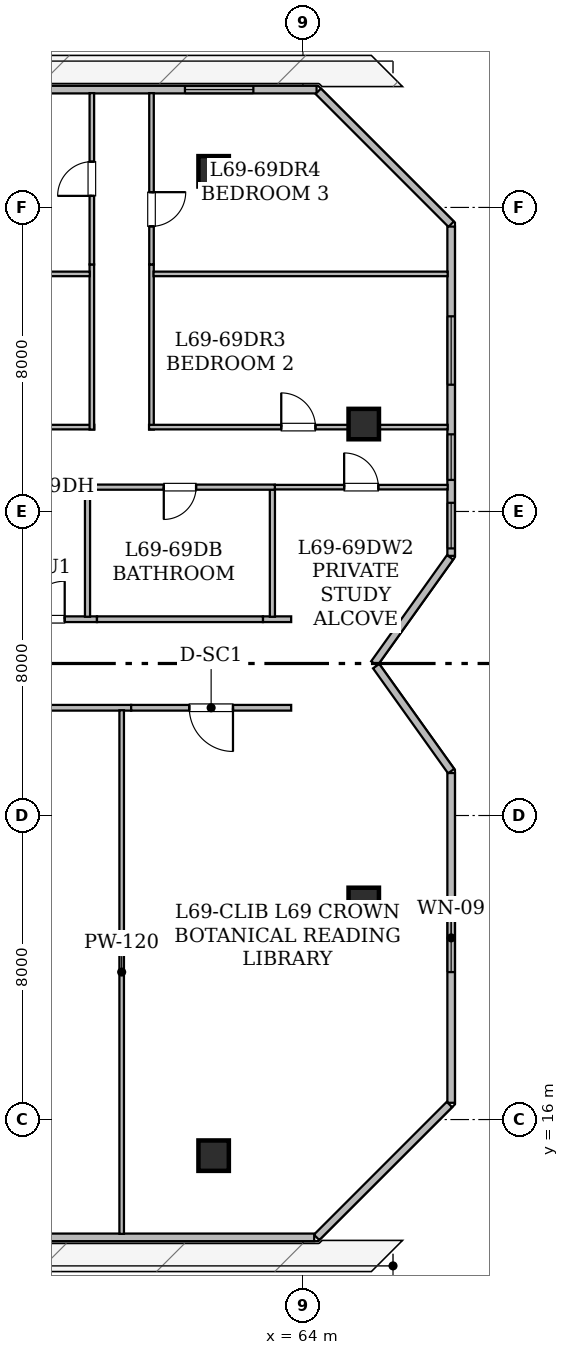
"""IFC4 building model, lengths in metres.
Left out: names, types, materials, properties, quantities, classifications, styles, units other than length and angle.
Written with IfcOpenShell. Run it as: python <this file> out.ifc"""

import sys

from ifc_helpers import new_model, si_unit, direction, frame, frame_2d, origin, origin_2d, place, context, subcontext, project, spatial, rectangle, hollow_rectangle, extrude, element, fill, save


model = new_model("IFC4")
c1 = context("Model", 3, precision=1e-05, world=origin(), true_north=direction((0.0, 1.0)))
c2 = subcontext(c1, "Body", "Model", "MODEL_VIEW")
j1 = project(units=[si_unit("LENGTHUNIT", "METRE"), si_unit("PLANEANGLEUNIT", "RADIAN")], contexts=[c1])
p1 = place(None, origin())
s1 = spatial("IfcSite", under=j1, at=p1, CompositionType="ELEMENT")
p2 = place(p1, origin())
s2 = spatial("IfcBuilding", under=s1, at=p2, CompositionType="ELEMENT")
p3 = place(p2, frame((0.0, 0.0, 269.45)))
s3 = spatial("IfcBuildingStorey", under=s2, at=p3, CompositionType="ELEMENT", Elevation=269.45)
for number, where, z_axis, x_axis in (
    (1, (61.65, 15.05, 0.025), (0.0, 0.0, 1.0), (1.0, 0.0, 0.0)),
    (2, (61.65, 40.95, 0.025), (0.0, 0.0, 1.0), (1.0, 0.0, 0.0)),
    (3, (65.6, 21.7, 0.025), (0.0, 0.0, 1.0), (1.0, 0.0, 0.0)),
    (4, (65.6, 34.3, 0.025), (0.0, 0.0, 1.0), (1.0, 0.0, 0.0)),
):
    element("IfcColumn", number, at=place(p3, frame(where, z_axis=z_axis, x_axis=x_axis)), inside=s3, PredefinedType="COLUMN", context=c2, shape_type="SweptSolid", body=[
        extrude(hollow_rectangle(XDim=0.8, YDim=0.8, WallThickness=0.04, at=origin_2d()), origin(), (0.0, 0.0, 1.0), 4.175),
    ])
p4 = place(p3, frame((25.702, 43.1, 0.0), z_axis=(0.0, 0.0, 1.0), x_axis=(1.0, 0.0, 0.0)))
e5 = element("IfcWall", 5, at=p4, inside=s3, PredefinedType="STANDARD", context=c2, shape_type="SweptSolid", body=[
    extrude(rectangle(XDim=38.657, YDim=0.2, at=frame_2d((19.329, 0.0))), origin(), (0.0, 0.0, 1.0), 3.95),
])
p5 = place(p4, frame((22.05, 0.0, 0.0)))
e6 = element("IfcOpeningElement", 6, at=p5, cuts=e5, PredefinedType="OPENING", context=c2, shape_type="SweptSolid", body=[
    extrude(rectangle(XDim=1.0, YDim=2.15, at=frame_2d((0.5, 1.075))), frame((0.0, 0.11, 0.0), z_axis=(0.0, -1.0, 0.0), x_axis=(1.0, 0.0, 0.0)), (0.0, 0.0, 1.0), 0.22),
])
p6 = place(p4, frame((18.633, 0.0, 0.78)))
e7 = element("IfcOpeningElement", 7, at=p6, cuts=e5, PredefinedType="OPENING", context=c2, shape_type="SweptSolid", body=[
    extrude(rectangle(XDim=1.2, YDim=1.5, at=frame_2d((0.6, 0.75))), frame((0.0, 0.11, 0.0), z_axis=(0.0, -1.0, 0.0), x_axis=(1.0, 0.0, 0.0)), (0.0, 0.0, 1.0), 0.22),
])
p7 = place(p4, frame((27.873, 0.0, 0.85)))
e8 = element("IfcOpeningElement", 8, at=p7, cuts=e5, PredefinedType="OPENING", context=c2, shape_type="SweptSolid", body=[
    extrude(rectangle(XDim=1.8, YDim=0.92, at=frame_2d((0.9, 0.46))), frame((0.0, 0.11, 0.0), z_axis=(0.0, -1.0, 0.0), x_axis=(1.0, 0.0, 0.0)), (0.0, 0.0, 1.0), 0.22),
])
p8 = place(p4, frame((35.193, 0.0, 0.85)))
e9 = element("IfcOpeningElement", 9, at=p8, cuts=e5, PredefinedType="OPENING", context=c2, shape_type="SweptSolid", body=[
    extrude(rectangle(XDim=1.8, YDim=0.92, at=frame_2d((0.9, 0.46))), frame((0.0, 0.11, 0.0), z_axis=(0.0, -1.0, 0.0), x_axis=(1.0, 0.0, 0.0)), (0.0, 0.0, 1.0), 0.22),
])
p9 = place(p3, frame((64.402, 43.057, 0.0), z_axis=(0.0, 0.0, 1.0), x_axis=(0.707106781187, -0.707106781187, 0.0)))
e10 = element("IfcWall", 10, at=p9, inside=s3, PredefinedType="STANDARD", context=c2, shape_type="SweptSolid", body=[
    extrude(rectangle(XDim=4.947, YDim=0.2, at=frame_2d((2.473, 0.0))), origin(), (0.0, 0.0, 1.0), 3.95),
])
p10 = place(p3, frame((67.9, 39.497, 0.0), z_axis=(0.0, 0.0, 1.0), x_axis=(0.0, -1.0, 0.0)))
e11 = element("IfcWall", 11, at=p10, inside=s3, PredefinedType="STANDARD", context=c2, shape_type="SweptSolid", body=[
    extrude(rectangle(XDim=8.665, YDim=0.2, at=frame_2d((4.333, 0.0))), origin(), (0.0, 0.0, 1.0), 3.95),
])
p11 = place(p10, frame((7.269, 0.0, 0.78)))
e12 = element("IfcOpeningElement", 12, at=p11, cuts=e11, PredefinedType="OPENING", context=c2, shape_type="SweptSolid", body=[
    extrude(rectangle(XDim=1.2, YDim=1.5, at=frame_2d((0.6, 0.75))), frame((0.0, 0.11, 0.0), z_axis=(0.0, -1.0, 0.0), x_axis=(1.0, 0.0, 0.0)), (0.0, 0.0, 1.0), 0.22),
])
p12 = place(p10, frame((5.467, 0.0, 0.78)))
e13 = element("IfcOpeningElement", 13, at=p12, cuts=e11, PredefinedType="OPENING", context=c2, shape_type="SweptSolid", body=[
    extrude(rectangle(XDim=1.2, YDim=1.5, at=frame_2d((0.6, 0.75))), frame((0.0, 0.11, 0.0), z_axis=(0.0, -1.0, 0.0), x_axis=(1.0, 0.0, 0.0)), (0.0, 0.0, 1.0), 0.22),
])
p13 = place(p10, frame((2.362, 0.0, 0.85)))
e14 = element("IfcOpeningElement", 14, at=p13, cuts=e11, PredefinedType="OPENING", context=c2, shape_type="SweptSolid", body=[
    extrude(rectangle(XDim=1.8, YDim=0.92, at=frame_2d((0.9, 0.46))), frame((0.0, 0.11, 0.0), z_axis=(0.0, -1.0, 0.0), x_axis=(1.0, 0.0, 0.0)), (0.0, 0.0, 1.0), 0.22),
])
p14 = place(p3, frame((67.872, 30.793, 0.0), z_axis=(0.0, 0.0, 1.0), x_axis=(-0.581265107027, -0.813714246743, 0.0)))
e15 = element("IfcWall", 15, at=p14, inside=s3, PredefinedType="STANDARD", context=c2, shape_type="SweptSolid", body=[
    extrude(rectangle(XDim=3.432, YDim=0.2, at=frame_2d((1.716, 0.0))), origin(), (0.0, 0.0, 1.0), 3.95),
])
p15 = place(p3, frame((65.926, 27.931, 0.0), z_axis=(0.0, 0.0, 1.0), x_axis=(0.581306204583, -0.813684887726, 0.0)))
e16 = element("IfcWall", 16, at=p15, inside=s3, PredefinedType="STANDARD", context=c2, shape_type="SweptSolid", body=[
    extrude(rectangle(XDim=3.396, YDim=0.2, at=frame_2d((1.698, 0.0))), origin(), (0.0, 0.0, 1.0), 3.95),
])
p16 = place(p3, frame((67.9, 25.118, 0.0), z_axis=(0.0, 0.0, 1.0), x_axis=(0.0, -1.0, 0.0)))
e17 = element("IfcWall", 17, at=p16, inside=s3, PredefinedType="STANDARD", context=c2, shape_type="SweptSolid", body=[
    extrude(rectangle(XDim=8.677, YDim=0.2, at=frame_2d((4.338, 0.0))), origin(), (0.0, 0.0, 1.0), 3.95),
])
p17 = place(p16, frame((3.438, 0.0, 0.85)))
e18 = element("IfcOpeningElement", 18, at=p17, cuts=e17, PredefinedType="OPENING", context=c2, shape_type="SweptSolid", body=[
    extrude(rectangle(XDim=1.8, YDim=0.92, at=frame_2d((0.9, 0.46))), frame((0.0, 0.11, 0.0), z_axis=(0.0, -1.0, 0.0), x_axis=(1.0, 0.0, 0.0)), (0.0, 0.0, 1.0), 0.22),
])
p18 = place(p3, frame((67.855, 16.396, 0.0), z_axis=(0.0, 0.0, 1.0), x_axis=(-0.707106781187, -0.707106781187, 0.0)))
e19 = element("IfcWall", 19, at=p18, inside=s3, PredefinedType="STANDARD", context=c2, shape_type="SweptSolid", body=[
    extrude(rectangle(XDim=4.944, YDim=0.2, at=frame_2d((2.472, 0.0))), origin(), (0.0, 0.0, 1.0), 3.95),
])
p19 = place(p3, frame((64.296, 12.9, 0.0), z_axis=(0.0, 0.0, 1.0), x_axis=(-1.0, 0.0, 0.0)))
e20 = element("IfcWall", 20, at=p19, inside=s3, PredefinedType="STANDARD", context=c2, shape_type="SweptSolid", body=[
    extrude(rectangle(XDim=38.593, YDim=0.2, at=frame_2d((19.296, 0.0))), origin(), (0.0, 0.0, 1.0), 3.95),
])
p20 = place(p19, frame((7.54, 0.0, 0.0)))
e21 = element("IfcOpeningElement", 21, at=p20, cuts=e20, PredefinedType="OPENING", context=c2, shape_type="SweptSolid", body=[
    extrude(rectangle(XDim=1.0, YDim=2.15, at=frame_2d((0.5, 1.075))), frame((0.0, 0.11, 0.0), z_axis=(0.0, -1.0, 0.0), x_axis=(1.0, 0.0, 0.0)), (0.0, 0.0, 1.0), 0.22),
])
p21 = place(p19, frame((18.396, 0.0, 0.78)))
e22 = element("IfcOpeningElement", 22, at=p21, cuts=e20, PredefinedType="OPENING", context=c2, shape_type="SweptSolid", body=[
    extrude(rectangle(XDim=1.2, YDim=1.5, at=frame_2d((0.6, 0.75))), frame((0.0, 0.11, 0.0), z_axis=(0.0, -1.0, 0.0), x_axis=(1.0, 0.0, 0.0)), (0.0, 0.0, 1.0), 0.22),
])
p22 = place(p19, frame((15.104, 0.0, 0.85)))
e23 = element("IfcOpeningElement", 23, at=p22, cuts=e20, PredefinedType="OPENING", context=c2, shape_type="SweptSolid", body=[
    extrude(rectangle(XDim=1.8, YDim=0.92, at=frame_2d((0.9, 0.46))), frame((0.0, 0.11, 0.0), z_axis=(0.0, -1.0, 0.0), x_axis=(1.0, 0.0, 0.0)), (0.0, 0.0, 1.0), 0.22),
])
p23 = place(p3, frame((59.479, 26.835, 0.0), z_axis=(0.0, 0.0, 1.0), x_axis=(-1.0, 0.0, 0.0)))
e24 = element("IfcWall", 24, at=p23, inside=s3, PredefinedType="STANDARD", context=c2, shape_type="SweptSolid", body=[
    extrude(rectangle(XDim=9.223, YDim=0.15, at=frame_2d((4.611, 0.0))), origin(), (0.0, 0.0, 1.0), 3.245),
])
p24 = place(p23, frame((4.161, 0.0, 0.0)))
e25 = element("IfcOpeningElement", 25, at=p24, cuts=e24, PredefinedType="OPENING", context=c2, shape_type="SweptSolid", body=[
    extrude(rectangle(XDim=0.9, YDim=2.1, at=frame_2d((0.45, 1.05))), frame((0.0, 0.085, 0.0), z_axis=(0.0, -1.0, 0.0), x_axis=(1.0, 0.0, 0.0)), (0.0, 0.0, 1.0), 0.17),
])
p25 = place(p3, frame((63.69, 26.835, 0.0), z_axis=(0.0, 0.0, 1.0), x_axis=(-1.0, 0.0, 0.0)))
e26 = element("IfcWall", 26, at=p25, inside=s3, PredefinedType="STANDARD", context=c2, shape_type="SweptSolid", body=[
    extrude(rectangle(XDim=4.211, YDim=0.15, at=frame_2d((2.105, 0.0))), origin(), (0.0, 0.0, 1.0), 3.95),
])
p26 = place(p25, frame((1.531, 0.0, 0.0)))
e27 = element("IfcOpeningElement", 27, at=p26, cuts=e26, PredefinedType="OPENING", context=c2, shape_type="SweptSolid", body=[
    extrude(rectangle(XDim=1.15, YDim=2.2, at=frame_2d((0.575, 1.1))), frame((0.0, 0.085, 0.0), z_axis=(0.0, -1.0, 0.0), x_axis=(1.0, 0.0, 0.0)), (0.0, 0.0, 1.0), 0.17),
])
p27 = place(p3, frame((62.947, 29.165, 0.0), z_axis=(0.0, 0.0, 1.0), x_axis=(1.0, 0.0, 0.0)))
e28 = element("IfcWall", 28, at=p27, inside=s3, PredefinedType="STANDARD", context=c2, shape_type="SweptSolid", body=[
    extrude(rectangle(XDim=0.743, YDim=0.15, at=frame_2d((0.372, 0.0))), origin(), (0.0, 0.0, 1.0), 3.95),
])
p28 = place(p3, frame((55.882, 29.165, 0.0), z_axis=(0.0, 0.0, 1.0), x_axis=(1.0, 0.0, 0.0)))
e29 = element("IfcWall", 29, at=p28, inside=s3, PredefinedType="STANDARD", context=c2, shape_type="SweptSolid", body=[
    extrude(rectangle(XDim=2.698, YDim=0.15, at=frame_2d((1.349, 0.0))), origin(), (0.0, 0.0, 1.0), 3.95),
])
p29 = place(p28, frame((0.849, 0.0, 0.0)))
e30 = element("IfcOpeningElement", 30, at=p29, cuts=e29, PredefinedType="OPENING", context=c2, shape_type="SweptSolid", body=[
    extrude(rectangle(XDim=1.0, YDim=2.15, at=frame_2d((0.5, 1.075))), frame((0.0, 0.085, 0.0), z_axis=(0.0, -1.0, 0.0), x_axis=(1.0, 0.0, 0.0)), (0.0, 0.0, 1.0), 0.17),
])
p30 = place(p3, frame((58.58, 29.165, 0.0), z_axis=(0.0, 0.0, 1.0), x_axis=(1.0, 0.0, 0.0)))
e31 = element("IfcWall", 31, at=p30, inside=s3, PredefinedType="STANDARD", context=c2, shape_type="SweptSolid", body=[
    extrude(rectangle(XDim=4.367, YDim=0.15, at=frame_2d((2.184, 0.0))), origin(), (0.0, 0.0, 1.0), 3.95),
])
p31 = place(p3, frame((59.23, 26.77, 0.0), z_axis=(0.0, 0.0, 1.0), x_axis=(0.0, -1.0, 0.0)))
e32 = element("IfcWall", 32, at=p31, inside=s3, PredefinedType="PARTITIONING", context=c2, shape_type="SweptSolid", body=[
    extrude(rectangle(XDim=13.778, YDim=0.12, at=frame_2d((6.889, 0.0))), origin(), (0.0, 0.0, 1.0), 3.245),
])
p32 = place(p3, frame((63.261, 32.64, 0.0), z_axis=(0.0, 0.0, 1.0), x_axis=(1.0, 0.0, 0.0)))
e33 = element("IfcWall", 33, at=p32, inside=s3, PredefinedType="PARTITIONING", context=c2, shape_type="SweptSolid", body=[
    extrude(rectangle(XDim=4.547, YDim=0.12, at=frame_2d((2.273, 0.0))), origin(), (0.0, 0.0, 1.0), 3.407),
])
p33 = place(p32, frame((1.823, 0.0, 0.0)))
e34 = element("IfcOpeningElement", 34, at=p33, cuts=e33, PredefinedType="OPENING", context=c2, shape_type="SweptSolid", body=[
    extrude(rectangle(XDim=0.9, YDim=2.1, at=frame_2d((0.45, 1.05))), frame((0.0, 0.07, 0.0), z_axis=(0.0, -1.0, 0.0), x_axis=(1.0, 0.0, 0.0)), (0.0, 0.0, 1.0), 0.14),
])
p34 = place(p3, frame((63.196, 29.23, 0.0), z_axis=(0.0, 0.0, 1.0), x_axis=(0.0, 1.0, 0.0)))
e35 = element("IfcWall", 35, at=p34, inside=s3, PredefinedType="PARTITIONING", context=c2, shape_type="SweptSolid", body=[
    extrude(rectangle(XDim=3.345, YDim=0.135, at=frame_2d((1.672, 0.0))), origin(), (0.0, 0.0, 1.0), 3.237),
])
p35 = place(p3, frame((63.261, 32.64, 0.0), z_axis=(0.0, 0.0, 1.0), x_axis=(-1.0, 0.0, 0.0)))
e36 = element("IfcWall", 36, at=p35, inside=s3, PredefinedType="PARTITIONING", context=c2, shape_type="SweptSolid", body=[
    extrude(rectangle(XDim=4.995, YDim=0.135, at=frame_2d((2.498, 0.0))), origin(), (0.0, 0.0, 1.0), 3.95),
])
p36 = place(p35, frame((2.073, 0.0, 0.0)))
e37 = element("IfcOpeningElement", 37, at=p36, cuts=e36, PredefinedType="OPENING", context=c2, shape_type="SweptSolid", body=[
    extrude(rectangle(XDim=0.85, YDim=2.1, at=frame_2d((0.425, 1.05))), frame((0.0, 0.077, 0.0), z_axis=(0.0, -1.0, 0.0), x_axis=(1.0, 0.0, 0.0)), (0.0, 0.0, 1.0), 0.155),
])
p37 = place(p3, frame((58.331, 32.705, 0.0), z_axis=(0.0, 0.0, 1.0), x_axis=(0.0, -1.0, 0.0)))
e38 = element("IfcWall", 38, at=p37, inside=s3, PredefinedType="PARTITIONING", context=c2, shape_type="SweptSolid", body=[
    extrude(rectangle(XDim=3.475, YDim=0.135, at=frame_2d((1.738, 0.0))), origin(), (0.0, 0.0, 1.0), 3.237),
])
p38 = place(p3, frame((50.577, 34.22, 0.0), z_axis=(0.0, 0.0, 1.0), x_axis=(1.0, 0.0, 0.0)))
e39 = element("IfcWall", 39, at=p38, inside=s3, PredefinedType="PARTITIONING", context=c2, shape_type="SweptSolid", body=[
    extrude(rectangle(XDim=7.933, YDim=0.12, at=frame_2d((3.967, 0.0))), origin(), (0.0, 0.0, 1.0), 3.237),
])
p39 = place(p38, frame((3.516, 0.0, 0.0)))
e40 = element("IfcOpeningElement", 40, at=p39, cuts=e39, PredefinedType="OPENING", context=c2, shape_type="SweptSolid", body=[
    extrude(rectangle(XDim=0.9, YDim=2.1, at=frame_2d((0.45, 1.05))), frame((0.0, 0.07, 0.0), z_axis=(0.0, -1.0, 0.0), x_axis=(1.0, 0.0, 0.0)), (0.0, 0.0, 1.0), 0.14),
])
p40 = place(p3, frame((58.445, 34.155, 0.0), z_axis=(0.0, 0.0, 1.0), x_axis=(0.0, 1.0, 0.0)))
e41 = element("IfcWall", 41, at=p40, inside=s3, PredefinedType="PARTITIONING", context=c2, shape_type="SweptSolid", body=[
    extrude(rectangle(XDim=4.345, YDim=0.12, at=frame_2d((2.172, 0.0))), origin(), (0.0, 0.0, 1.0), 3.237),
])
p41 = place(p3, frame((58.445, 38.5, 0.0), z_axis=(0.0, 0.0, 1.0), x_axis=(0.0, 1.0, 0.0)))
e42 = element("IfcWall", 42, at=p41, inside=s3, PredefinedType="PARTITIONING", context=c2, shape_type="SweptSolid", body=[
    extrude(rectangle(XDim=4.508, YDim=0.12, at=frame_2d((2.254, 0.0))), origin(), (0.0, 0.0, 1.0), 3.245),
])
p42 = place(p41, frame((1.804, 0.0, 0.0)))
e43 = element("IfcOpeningElement", 43, at=p42, cuts=e42, PredefinedType="OPENING", context=c2, shape_type="SweptSolid", body=[
    extrude(rectangle(XDim=0.9, YDim=2.1, at=frame_2d((0.45, 1.05))), frame((0.0, 0.07, 0.0), z_axis=(0.0, -1.0, 0.0), x_axis=(1.0, 0.0, 0.0)), (0.0, 0.0, 1.0), 0.14),
])
p43 = place(p3, frame((60.015, 38.5, 0.0), z_axis=(0.0, 0.0, 1.0), x_axis=(0.0, -1.0, 0.0)))
e44 = element("IfcWall", 44, at=p43, inside=s3, PredefinedType="PARTITIONING", context=c2, shape_type="SweptSolid", body=[
    extrude(rectangle(XDim=4.345, YDim=0.12, at=frame_2d((2.172, 0.0))), origin(), (0.0, 0.0, 1.0), 3.237),
])
p44 = place(p3, frame((59.95, 34.22, 0.0), z_axis=(0.0, 0.0, 1.0), x_axis=(1.0, 0.0, 0.0)))
e45 = element("IfcWall", 45, at=p44, inside=s3, PredefinedType="PARTITIONING", context=c2, shape_type="SweptSolid", body=[
    extrude(rectangle(XDim=7.858, YDim=0.12, at=frame_2d((3.929, 0.0))), origin(), (0.0, 0.0, 1.0), 3.237),
])
p45 = place(p44, frame((3.479, 0.0, 0.0)))
e46 = element("IfcOpeningElement", 46, at=p45, cuts=e45, PredefinedType="OPENING", context=c2, shape_type="SweptSolid", body=[
    extrude(rectangle(XDim=0.9, YDim=2.1, at=frame_2d((0.45, 1.05))), frame((0.0, 0.07, 0.0), z_axis=(0.0, -1.0, 0.0), x_axis=(1.0, 0.0, 0.0)), (0.0, 0.0, 1.0), 0.14),
])
p46 = place(p3, frame((60.015, 43.008, 0.0), z_axis=(0.0, 0.0, 1.0), x_axis=(0.0, -1.0, 0.0)))
e47 = element("IfcWall", 47, at=p46, inside=s3, PredefinedType="PARTITIONING", context=c2, shape_type="SweptSolid", body=[
    extrude(rectangle(XDim=4.508, YDim=0.12, at=frame_2d((2.254, 0.0))), origin(), (0.0, 0.0, 1.0), 3.245),
])
p47 = place(p46, frame((2.606, 0.0, 0.0)))
e48 = element("IfcOpeningElement", 48, at=p47, cuts=e47, PredefinedType="OPENING", context=c2, shape_type="SweptSolid", body=[
    extrude(rectangle(XDim=0.9, YDim=2.1, at=frame_2d((0.45, 1.05))), frame((0.0, 0.07, 0.0), z_axis=(0.0, -1.0, 0.0), x_axis=(1.0, 0.0, 0.0)), (0.0, 0.0, 1.0), 0.14),
])
p48 = place(p3, frame((50.577, 38.251, 0.0), z_axis=(0.0, 0.0, 1.0), x_axis=(1.0, 0.0, 0.0)))
e49 = element("IfcWall", 49, at=p48, inside=s3, PredefinedType="PARTITIONING", context=c2, shape_type="SweptSolid", body=[
    extrude(rectangle(XDim=7.814, YDim=0.12, at=frame_2d((3.907, 0.0))), origin(), (0.0, 0.0, 1.0), 3.245),
])
p49 = place(p3, frame((60.069, 38.251, 0.0), z_axis=(0.0, 0.0, 1.0), x_axis=(1.0, 0.0, 0.0)))
e50 = element("IfcWall", 50, at=p49, inside=s3, PredefinedType="PARTITIONING", context=c2, shape_type="SweptSolid", body=[
    extrude(rectangle(XDim=7.739, YDim=0.12, at=frame_2d((3.87, 0.0))), origin(), (0.0, 0.0, 1.0), 3.407),
])
p50 = place(p17, origin())
e51 = element("IfcWindow", 51, at=p50, inside=s3, PartitioningType="SINGLE_PANEL", PredefinedType="WINDOW", context=c2, shape_type="SweptSolid", body=[
    extrude(rectangle(XDim=1.8, YDim=0.92, at=frame_2d((0.9, 0.46))), frame((0.0, 0.03, 0.0), z_axis=(0.0, -1.0, 0.0), x_axis=(1.0, 0.0, 0.0)), (0.0, 0.0, 1.0), 0.06),
])
fill(e18, e51)
p51 = place(p11, origin())
e52 = element("IfcWindow", 52, at=p51, inside=s3, PartitioningType="SINGLE_PANEL", PredefinedType="WINDOW", context=c2, shape_type="SweptSolid", body=[
    extrude(rectangle(XDim=1.2, YDim=1.5, at=frame_2d((0.6, 0.75))), frame((0.0, 0.03, 0.0), z_axis=(0.0, -1.0, 0.0), x_axis=(1.0, 0.0, 0.0)), (0.0, 0.0, 1.0), 0.06),
])
fill(e12, e52)
p52 = place(p12, origin())
e53 = element("IfcWindow", 53, at=p52, inside=s3, PartitioningType="SINGLE_PANEL", PredefinedType="WINDOW", context=c2, shape_type="SweptSolid", body=[
    extrude(rectangle(XDim=1.2, YDim=1.5, at=frame_2d((0.6, 0.75))), frame((0.0, 0.03, 0.0), z_axis=(0.0, -1.0, 0.0), x_axis=(1.0, 0.0, 0.0)), (0.0, 0.0, 1.0), 0.06),
])
fill(e13, e53)
p53 = place(p13, origin())
e54 = element("IfcWindow", 54, at=p53, inside=s3, PartitioningType="SINGLE_PANEL", PredefinedType="WINDOW", context=c2, shape_type="SweptSolid", body=[
    extrude(rectangle(XDim=1.8, YDim=0.92, at=frame_2d((0.9, 0.46))), frame((0.0, 0.03, 0.0), z_axis=(0.0, -1.0, 0.0), x_axis=(1.0, 0.0, 0.0)), (0.0, 0.0, 1.0), 0.06),
])
fill(e14, e54)
p54 = place(p8, origin())
e55 = element("IfcWindow", 55, at=p54, inside=s3, PartitioningType="SINGLE_PANEL", PredefinedType="WINDOW", context=c2, shape_type="SweptSolid", body=[
    extrude(rectangle(XDim=1.8, YDim=0.92, at=frame_2d((0.9, 0.46))), frame((0.0, 0.03, 0.0), z_axis=(0.0, -1.0, 0.0), x_axis=(1.0, 0.0, 0.0)), (0.0, 0.0, 1.0), 0.06),
])
fill(e9, e55)
p55 = place(p26, origin())
e56 = element("IfcDoor", 56, at=p55, inside=s3, OperationType="SINGLE_SWING_LEFT", PredefinedType="DOOR", context=c2, shape_type="SweptSolid", body=[
    extrude(rectangle(XDim=1.15, YDim=2.2, at=frame_2d((0.575, 1.1))), frame((0.0, 0.025, 0.0), z_axis=(0.0, -1.0, 0.0), x_axis=(1.0, 0.0, 0.0)), (0.0, 0.0, 1.0), 0.05),
])
fill(e27, e56)
p56 = place(p29, origin())
e57 = element("IfcDoor", 57, at=p56, inside=s3, OperationType="SINGLE_SWING_RIGHT", PredefinedType="DOOR", context=c2, shape_type="SweptSolid", body=[
    extrude(rectangle(XDim=1.0, YDim=2.15, at=frame_2d((0.5, 1.075))), frame((0.0, 0.025, 0.0), z_axis=(0.0, -1.0, 0.0), x_axis=(1.0, 0.0, 0.0)), (0.0, 0.0, 1.0), 0.05),
])
fill(e30, e57)
p57 = place(p33, origin())
e58 = element("IfcDoor", 58, at=p57, inside=s3, OperationType="SINGLE_SWING_LEFT", PredefinedType="DOOR", context=c2, shape_type="SweptSolid", body=[
    extrude(rectangle(XDim=0.9, YDim=2.1, at=frame_2d((0.45, 1.05))), frame((0.0, 0.025, 0.0), z_axis=(0.0, -1.0, 0.0), x_axis=(1.0, 0.0, 0.0)), (0.0, 0.0, 1.0), 0.05),
])
fill(e34, e58)
p58 = place(p36, origin())
e59 = element("IfcDoor", 59, at=p58, inside=s3, OperationType="SINGLE_SWING_RIGHT", PredefinedType="DOOR", context=c2, shape_type="SweptSolid", body=[
    extrude(rectangle(XDim=0.85, YDim=2.1, at=frame_2d((0.425, 1.05))), frame((0.0, 0.025, 0.0), z_axis=(0.0, -1.0, 0.0), x_axis=(1.0, 0.0, 0.0)), (0.0, 0.0, 1.0), 0.05),
])
fill(e37, e59)
p59 = place(p42, origin())
e60 = element("IfcDoor", 60, at=p59, inside=s3, OperationType="SINGLE_SWING_LEFT", PredefinedType="DOOR", context=c2, shape_type="SweptSolid", body=[
    extrude(rectangle(XDim=0.9, YDim=2.1, at=frame_2d((0.45, 1.05))), frame((0.0, 0.025, 0.0), z_axis=(0.0, -1.0, 0.0), x_axis=(1.0, 0.0, 0.0)), (0.0, 0.0, 1.0), 0.05),
])
fill(e43, e60)
p60 = place(p45, origin())
e61 = element("IfcDoor", 61, at=p60, inside=s3, OperationType="SINGLE_SWING_LEFT", PredefinedType="DOOR", context=c2, shape_type="SweptSolid", body=[
    extrude(rectangle(XDim=0.9, YDim=2.1, at=frame_2d((0.45, 1.05))), frame((0.0, 0.025, 0.0), z_axis=(0.0, -1.0, 0.0), x_axis=(1.0, 0.0, 0.0)), (0.0, 0.0, 1.0), 0.05),
])
fill(e46, e61)
p61 = place(p47, origin())
e62 = element("IfcDoor", 62, at=p61, inside=s3, OperationType="SINGLE_SWING_LEFT", PredefinedType="DOOR", context=c2, shape_type="SweptSolid", body=[
    extrude(rectangle(XDim=0.9, YDim=2.1, at=frame_2d((0.45, 1.05))), frame((0.0, 0.025, 0.0), z_axis=(0.0, -1.0, 0.0), x_axis=(1.0, 0.0, 0.0)), (0.0, 0.0, 1.0), 0.05),
])
fill(e48, e62)
save(model, sys.argv[1])
